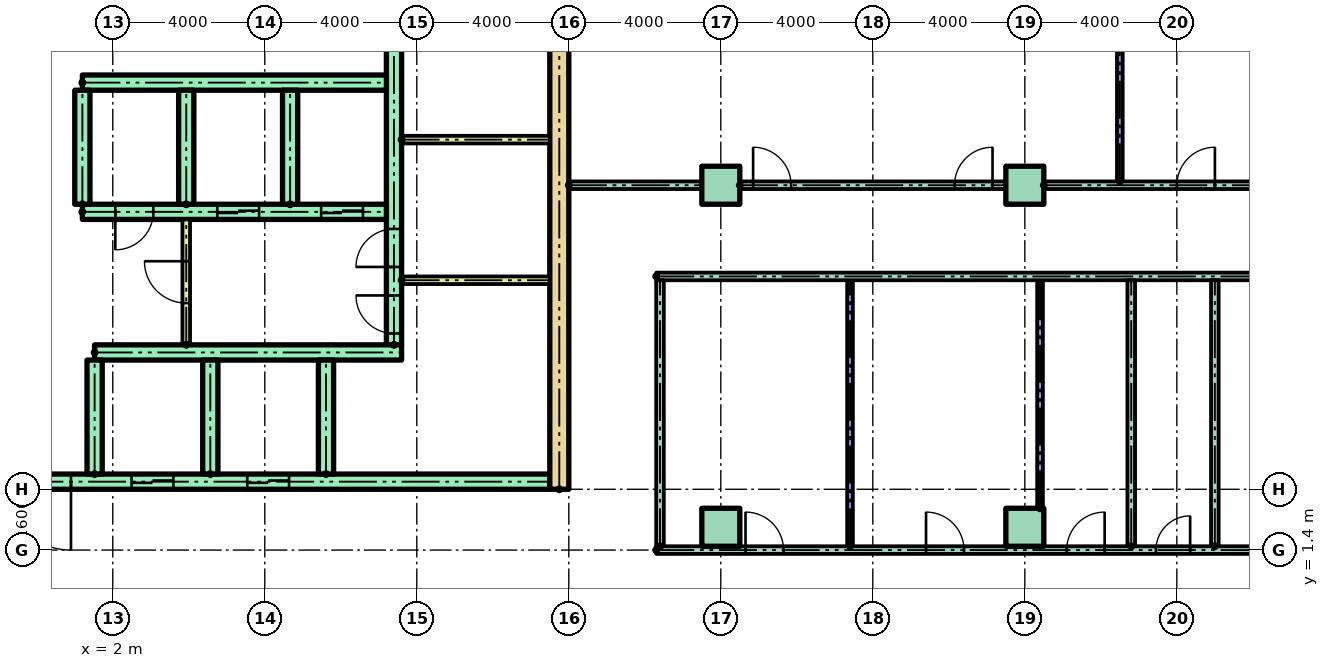
"""IFC4 building model, lengths in metres.
Left out: names, types, materials, properties, quantities, classifications, styles, units other than length and angle.
Written with IfcOpenShell. Run it as: python <this file> out.ifc"""

import sys

from ifc_helpers import new_model, si_unit, direction, frame, frame_2d, origin, origin_2d, place, context, subcontext, project, spatial, rectangle, extrude, element, fill, save


model = new_model("IFC4")
c1 = context("Model", 3, precision=1e-05, world=origin(), true_north=direction((0.0, 1.0)))
c2 = subcontext(c1, "Body", "Model", "MODEL_VIEW")
j1 = project(units=[si_unit("LENGTHUNIT", "METRE"), si_unit("PLANEANGLEUNIT", "RADIAN")], contexts=[c1])
p1 = place(None, origin())
s1 = spatial("IfcSite", under=j1, at=p1, CompositionType="ELEMENT")
p2 = place(p1, origin())
s2 = spatial("IfcBuilding", under=s1, at=p2, CompositionType="ELEMENT")
p3 = place(p2, frame((0.0, 0.0, 14.0)))
s3 = spatial("IfcBuildingStorey", under=s2, at=p3, CompositionType="ELEMENT", Elevation=14.0)
for number, where in (
    (1, (18.0, 2.0, 0.0)),
    (2, (26.0, 2.0, 0.0)),
    (3, (18.0, 11.0, 0.0)),
    (4, (26.0, 11.0, 0.0)),
):
    element("IfcColumn", number, at=place(p3, frame(where)), inside=s3, PredefinedType="COLUMN", context=c2, shape_type="SweptSolid", body=[
        extrude(rectangle(XDim=1.0, YDim=1.0, at=origin_2d()), origin(), (0.0, 0.0, 1.0), 4.0),
    ])
p4 = place(p3, frame((13.75, 3.0, 0.0), z_axis=(0.0, 0.0, 1.0), x_axis=(0.0, 1.0, 0.0)))
e5 = element("IfcWall", 5, at=p4, inside=s3, PredefinedType="SHEAR", context=c2, shape_type="SweptSolid", body=[
    extrude(rectangle(XDim=17.0, YDim=0.5, at=frame_2d((8.5, 0.0))), origin(), (0.0, 0.0, 1.0), 3.7),
])
p5 = place(p3, frame((9.4, 6.8, 0.0), z_axis=(0.0, 0.0, 1.0), x_axis=(0.0, 1.0, 0.0)))
e6 = element("IfcWall", 6, at=p5, inside=s3, PredefinedType="SHEAR", context=c2, shape_type="SweptSolid", body=[
    extrude(rectangle(XDim=12.7, YDim=0.4, at=frame_2d((6.35, 0.0))), origin(), (0.0, 0.0, 1.0), 3.7),
])
p6 = place(p5, frame((0.3, 0.0, 0.0)))
e7 = element("IfcOpeningElement", 7, at=p6, cuts=e6, PredefinedType="OPENING", context=c2, shape_type="SweptSolid", body=[
    extrude(rectangle(XDim=1.0, YDim=2.1, at=frame_2d((0.5, 1.05))), frame((0.0, 0.21, 0.0), z_axis=(0.0, -1.0, 0.0), x_axis=(1.0, 0.0, 0.0)), (0.0, 0.0, 1.0), 0.42),
])
p7 = place(p5, frame((2.05, 0.0, 0.0)))
e8 = element("IfcOpeningElement", 8, at=p7, cuts=e6, PredefinedType="OPENING", context=c2, shape_type="SweptSolid", body=[
    extrude(rectangle(XDim=1.0, YDim=2.1, at=frame_2d((0.5, 1.05))), frame((0.0, 0.21, 0.0), z_axis=(0.0, -1.0, 0.0), x_axis=(1.0, 0.0, 0.0)), (0.0, 0.0, 1.0), 0.42),
])
p8 = place(p5, frame((7.925, 0.0, 0.0)))
e9 = element("IfcOpeningElement", 9, at=p8, cuts=e6, PredefinedType="OPENING", context=c2, shape_type="SweptSolid", body=[
    extrude(rectangle(XDim=1.0, YDim=2.1, at=frame_2d((0.5, 1.05))), frame((0.0, 0.21, 0.0), z_axis=(0.0, -1.0, 0.0), x_axis=(1.0, 0.0, 0.0)), (0.0, 0.0, 1.0), 0.42),
])
p9 = place(p3, frame((-13.5, 3.2, 0.0)))
e10 = element("IfcWall", 10, at=p9, inside=s3, PredefinedType="SHEAR", context=c2, shape_type="SweptSolid", body=[
    extrude(rectangle(XDim=27.0, YDim=0.4, at=frame_2d((13.5, 0.0))), origin(), (0.0, 0.0, 1.0), 3.7),
])
p10 = place(p9, frame((6.861, 0.0, 0.0)))
e11 = element("IfcOpeningElement", 11, at=p10, cuts=e10, PredefinedType="OPENING", context=c2, shape_type="SweptSolid", body=[
    extrude(rectangle(XDim=1.1, YDim=2.1, at=frame_2d((0.55, 1.05))), frame((0.0, 0.21, 0.0), z_axis=(0.0, -1.0, 0.0), x_axis=(1.0, 0.0, 0.0)), (0.0, 0.0, 1.0), 0.42),
])
p11 = place(p9, frame((9.906, 0.0, 0.0)))
e12 = element("IfcOpeningElement", 12, at=p11, cuts=e10, PredefinedType="OPENING", context=c2, shape_type="SweptSolid", body=[
    extrude(rectangle(XDim=1.1, YDim=2.1, at=frame_2d((0.55, 1.05))), frame((0.0, 0.21, 0.0), z_axis=(0.0, -1.0, 0.0), x_axis=(1.0, 0.0, 0.0)), (0.0, 0.0, 1.0), 0.42),
])
p12 = place(p9, frame((15.994, 0.0, 0.0)))
e13 = element("IfcOpeningElement", 13, at=p12, cuts=e10, PredefinedType="OPENING", context=c2, shape_type="SweptSolid", body=[
    extrude(rectangle(XDim=1.1, YDim=2.1, at=frame_2d((0.55, 1.05))), frame((0.0, 0.21, 0.0), z_axis=(0.0, -1.0, 0.0), x_axis=(1.0, 0.0, 0.0)), (0.0, 0.0, 1.0), 0.42),
])
p13 = place(p9, frame((19.039, 0.0, 0.0)))
e14 = element("IfcOpeningElement", 14, at=p13, cuts=e10, PredefinedType="OPENING", context=c2, shape_type="SweptSolid", body=[
    extrude(rectangle(XDim=1.1, YDim=2.1, at=frame_2d((0.55, 1.05))), frame((0.0, 0.21, 0.0), z_axis=(0.0, -1.0, 0.0), x_axis=(1.0, 0.0, 0.0)), (0.0, 0.0, 1.0), 0.42),
])
p14 = place(p9, frame((12.6, 0.0, 0.0)))
e15 = element("IfcOpeningElement", 15, at=p14, cuts=e10, PredefinedType="OPENING", context=c2, shape_type="SweptSolid", body=[
    extrude(rectangle(XDim=1.8, YDim=2.1, at=frame_2d((0.9, 1.05))), frame((0.0, 0.21, 0.0), z_axis=(0.0, -1.0, 0.0), x_axis=(1.0, 0.0, 0.0)), (0.0, 0.0, 1.0), 0.42),
])
p15 = place(p3, frame((1.522, 6.6, 0.0)))
e16 = element("IfcWall", 16, at=p15, inside=s3, PredefinedType="SHEAR", context=c2, shape_type="SweptSolid", body=[
    extrude(rectangle(XDim=8.078, YDim=0.4, at=frame_2d((4.039, 0.0))), origin(), (0.0, 0.0, 1.0), 3.7),
])
for number, where, z_axis, x_axis in (
    (17, (1.522, 3.4, 0.0), (0.0, 0.0, 1.0), (0.0, 1.0, 0.0)),
    (18, (4.567, 3.4, 0.0), (0.0, 0.0, 1.0), (0.0, 1.0, 0.0)),
    (19, (7.611, 3.4, 0.0), (0.0, 0.0, 1.0), (0.0, 1.0, 0.0)),
):
    element("IfcWall", number, at=place(p3, frame(where, z_axis=z_axis, x_axis=x_axis)), inside=s3, PredefinedType="SHEAR", context=c2, shape_type="SweptSolid", body=[
        extrude(rectangle(XDim=3.0, YDim=0.4, at=frame_2d((1.5, 0.0))), origin(), (0.0, 0.0, 1.0), 3.7),
    ])
p16 = place(p3, frame((1.2, 10.3, 0.0)))
e20 = element("IfcWall", 20, at=p16, inside=s3, PredefinedType="SHEAR", context=c2, shape_type="SweptSolid", body=[
    extrude(rectangle(XDim=8.0, YDim=0.4, at=frame_2d((4.0, 0.0))), origin(), (0.0, 0.0, 1.0), 3.7),
])
p17 = place(p16, frame((3.55, 0.0, 0.0)))
e21 = element("IfcOpeningElement", 21, at=p17, cuts=e20, PredefinedType="OPENING", context=c2, shape_type="SweptSolid", body=[
    extrude(rectangle(XDim=1.1, YDim=2.1, at=frame_2d((0.55, 1.05))), frame((0.0, 0.21, 0.0), z_axis=(0.0, -1.0, 0.0), x_axis=(1.0, 0.0, 0.0)), (0.0, 0.0, 1.0), 0.42),
])
p18 = place(p16, frame((6.283, 0.0, 0.0)))
e22 = element("IfcOpeningElement", 22, at=p18, cuts=e20, PredefinedType="OPENING", context=c2, shape_type="SweptSolid", body=[
    extrude(rectangle(XDim=1.1, YDim=2.1, at=frame_2d((0.55, 1.05))), frame((0.0, 0.21, 0.0), z_axis=(0.0, -1.0, 0.0), x_axis=(1.0, 0.0, 0.0)), (0.0, 0.0, 1.0), 0.42),
])
p19 = place(p16, frame((0.867, 0.0, 0.0)))
e23 = element("IfcOpeningElement", 23, at=p19, cuts=e20, PredefinedType="OPENING", context=c2, shape_type="SweptSolid", body=[
    extrude(rectangle(XDim=1.0, YDim=2.1, at=frame_2d((0.5, 1.05))), frame((0.0, 0.21, 0.0), z_axis=(0.0, -1.0, 0.0), x_axis=(1.0, 0.0, 0.0)), (0.0, 0.0, 1.0), 0.42),
])
p20 = place(p3, frame((1.2, 13.7, 0.0)))
e24 = element("IfcWall", 24, at=p20, inside=s3, PredefinedType="SHEAR", context=c2, shape_type="SweptSolid", body=[
    extrude(rectangle(XDim=8.0, YDim=0.4, at=frame_2d((4.0, 0.0))), origin(), (0.0, 0.0, 1.0), 3.7),
])
for number, where, z_axis, x_axis in (
    (25, (1.2, 10.5, 0.0), (0.0, 0.0, 1.0), (0.0, 1.0, 0.0)),
    (26, (3.933, 10.5, 0.0), (0.0, 0.0, 1.0), (0.0, 1.0, 0.0)),
    (27, (6.667, 10.5, 0.0), (0.0, 0.0, 1.0), (0.0, 1.0, 0.0)),
):
    element("IfcWall", number, at=place(p3, frame(where, z_axis=z_axis, x_axis=x_axis)), inside=s3, PredefinedType="SHEAR", context=c2, shape_type="SweptSolid", body=[
        extrude(rectangle(XDim=3.0, YDim=0.4, at=frame_2d((1.5, 0.0))), origin(), (0.0, 0.0, 1.0), 3.7),
    ])
p21 = place(p3, frame((3.933, 6.8, 0.0), z_axis=(0.0, 0.0, 1.0), x_axis=(0.0, 1.0, 0.0)))
e28 = element("IfcWall", 28, at=p21, inside=s3, PredefinedType="PARTITIONING", context=c2, shape_type="SweptSolid", body=[
    extrude(rectangle(XDim=3.3, YDim=0.2, at=frame_2d((1.65, 0.0))), origin(), (0.0, 0.0, 1.0), 3.7),
])
p22 = place(p21, frame((1.1, 0.0, 0.0)))
e29 = element("IfcOpeningElement", 29, at=p22, cuts=e28, PredefinedType="OPENING", context=c2, shape_type="SweptSolid", body=[
    extrude(rectangle(XDim=1.1, YDim=2.1, at=frame_2d((0.55, 1.05))), frame((0.0, 0.11, 0.0), z_axis=(0.0, -1.0, 0.0), x_axis=(1.0, 0.0, 0.0)), (0.0, 0.0, 1.0), 0.22),
])
for number, where in (
    (30, (9.6, 8.5, 0.0)),
    (31, (9.6, 12.2, 0.0)),
):
    element("IfcWall", number, at=place(p3, frame(where)), inside=s3, PredefinedType="PARTITIONING", context=c2, shape_type="SweptSolid", body=[
        extrude(rectangle(XDim=3.9, YDim=0.2, at=frame_2d((1.95, 0.0))), origin(), (0.0, 0.0, 1.0), 3.7),
    ])
p23 = place(p3, frame((16.3, 1.4, 0.0)))
e32 = element("IfcWall", 32, at=p23, inside=s3, PredefinedType="PARTITIONING", context=c2, shape_type="SweptSolid", body=[
    extrude(rectangle(XDim=20.6, YDim=0.2, at=frame_2d((10.3, 0.0))), origin(), (0.0, 0.0, 1.0), 3.7),
])
p24 = place(p23, frame((2.35, 0.0, 0.0)))
e33 = element("IfcOpeningElement", 33, at=p24, cuts=e32, PredefinedType="OPENING", context=c2, shape_type="SweptSolid", body=[
    extrude(rectangle(XDim=1.0, YDim=2.1, at=frame_2d((0.5, 1.05))), frame((0.0, 0.11, 0.0), z_axis=(0.0, -1.0, 0.0), x_axis=(1.0, 0.0, 0.0)), (0.0, 0.0, 1.0), 0.22),
])
p25 = place(p23, frame((7.1, 0.0, 0.0)))
e34 = element("IfcOpeningElement", 34, at=p25, cuts=e32, PredefinedType="OPENING", context=c2, shape_type="SweptSolid", body=[
    extrude(rectangle(XDim=1.0, YDim=2.1, at=frame_2d((0.5, 1.05))), frame((0.0, 0.11, 0.0), z_axis=(0.0, -1.0, 0.0), x_axis=(1.0, 0.0, 0.0)), (0.0, 0.0, 1.0), 0.22),
])
p26 = place(p23, frame((10.8, 0.0, 0.0)))
e35 = element("IfcOpeningElement", 35, at=p26, cuts=e32, PredefinedType="OPENING", context=c2, shape_type="SweptSolid", body=[
    extrude(rectangle(XDim=1.0, YDim=2.1, at=frame_2d((0.5, 1.05))), frame((0.0, 0.11, 0.0), z_axis=(0.0, -1.0, 0.0), x_axis=(1.0, 0.0, 0.0)), (0.0, 0.0, 1.0), 0.22),
])
p27 = place(p23, frame((13.15, 0.0, 0.0)))
e36 = element("IfcOpeningElement", 36, at=p27, cuts=e32, PredefinedType="OPENING", context=c2, shape_type="SweptSolid", body=[
    extrude(rectangle(XDim=0.9, YDim=2.1, at=frame_2d((0.45, 1.05))), frame((0.0, 0.11, 0.0), z_axis=(0.0, -1.0, 0.0), x_axis=(1.0, 0.0, 0.0)), (0.0, 0.0, 1.0), 0.22),
])
p28 = place(p3, frame((16.3, 8.6, 0.0)))
e37 = element("IfcWall", 37, at=p28, inside=s3, PredefinedType="PARTITIONING", context=c2, shape_type="SweptSolid", body=[
    extrude(rectangle(XDim=21.3, YDim=0.2, at=frame_2d((10.65, 0.0))), origin(), (0.0, 0.0, 1.0), 3.7),
])
p29 = place(p3, frame((14.0, 11.0, 0.0)))
e38 = element("IfcWall", 38, at=p29, inside=s3, PredefinedType="PARTITIONING", context=c2, shape_type="SweptSolid", body=[
    extrude(rectangle(XDim=3.5, YDim=0.2, at=frame_2d((1.75, 0.0))), origin(), (0.0, 0.0, 1.0), 3.7),
])
p30 = place(p3, frame((18.5, 11.0, 0.0)))
e39 = element("IfcWall", 39, at=p30, inside=s3, PredefinedType="PARTITIONING", context=c2, shape_type="SweptSolid", body=[
    extrude(rectangle(XDim=7.0, YDim=0.2, at=frame_2d((3.5, 0.0))), origin(), (0.0, 0.0, 1.0), 3.7),
])
p31 = place(p30, frame((0.35, 0.0, 0.0)))
e40 = element("IfcOpeningElement", 40, at=p31, cuts=e39, PredefinedType="OPENING", context=c2, shape_type="SweptSolid", body=[
    extrude(rectangle(XDim=1.0, YDim=2.1, at=frame_2d((0.5, 1.05))), frame((0.0, 0.11, 0.0), z_axis=(0.0, -1.0, 0.0), x_axis=(1.0, 0.0, 0.0)), (0.0, 0.0, 1.0), 0.22),
])
p32 = place(p30, frame((5.65, 0.0, 0.0)))
e41 = element("IfcOpeningElement", 41, at=p32, cuts=e39, PredefinedType="OPENING", context=c2, shape_type="SweptSolid", body=[
    extrude(rectangle(XDim=1.0, YDim=2.1, at=frame_2d((0.5, 1.05))), frame((0.0, 0.11, 0.0), z_axis=(0.0, -1.0, 0.0), x_axis=(1.0, 0.0, 0.0)), (0.0, 0.0, 1.0), 0.22),
])
p33 = place(p3, frame((26.5, 11.0, 0.0)))
e42 = element("IfcWall", 42, at=p33, inside=s3, PredefinedType="PARTITIONING", context=c2, shape_type="SweptSolid", body=[
    extrude(rectangle(XDim=7.0, YDim=0.2, at=frame_2d((3.5, 0.0))), origin(), (0.0, 0.0, 1.0), 3.7),
])
p34 = place(p33, frame((3.502, 0.0, 0.0)))
e43 = element("IfcOpeningElement", 43, at=p34, cuts=e42, PredefinedType="OPENING", context=c2, shape_type="SweptSolid", body=[
    extrude(rectangle(XDim=1.0, YDim=2.1, at=frame_2d((0.5, 1.05))), frame((0.0, 0.11, 0.0), z_axis=(0.0, -1.0, 0.0), x_axis=(1.0, 0.0, 0.0)), (0.0, 0.0, 1.0), 0.22),
])
p35 = place(p33, frame((5.65, 0.0, 0.0)))
e44 = element("IfcOpeningElement", 44, at=p35, cuts=e42, PredefinedType="OPENING", context=c2, shape_type="SweptSolid", body=[
    extrude(rectangle(XDim=1.0, YDim=2.1, at=frame_2d((0.5, 1.05))), frame((0.0, 0.11, 0.0), z_axis=(0.0, -1.0, 0.0), x_axis=(1.0, 0.0, 0.0)), (0.0, 0.0, 1.0), 0.22),
])
p36 = place(p3, frame((16.4, 1.5, 0.0), z_axis=(0.0, 0.0, 1.0), x_axis=(0.0, 1.0, 0.0)))
e45 = element("IfcWall", 45, at=p36, inside=s3, PredefinedType="PARTITIONING", context=c2, shape_type="SweptSolid", body=[
    extrude(rectangle(XDim=7.0, YDim=0.2, at=frame_2d((3.5, 0.0))), origin(), (0.0, 0.0, 1.0), 3.7),
])
p37 = place(p3, frame((21.4, 1.5, 0.0), z_axis=(0.0, 0.0, 1.0), x_axis=(0.0, 1.0, 0.0)))
e46 = element("IfcWall", 46, at=p37, inside=s3, PredefinedType="PARTITIONING", context=c2, shape_type="SweptSolid", body=[
    extrude(rectangle(XDim=7.0, YDim=0.15, at=frame_2d((3.5, 0.0))), origin(), (0.0, 0.0, 1.0), 3.7),
])
p38 = place(p3, frame((26.4, 2.5, 0.0), z_axis=(0.0, 0.0, 1.0), x_axis=(0.0, 1.0, 0.0)))
e47 = element("IfcWall", 47, at=p38, inside=s3, PredefinedType="PARTITIONING", context=c2, shape_type="SweptSolid", body=[
    extrude(rectangle(XDim=6.0, YDim=0.15, at=frame_2d((3.0, 0.0))), origin(), (0.0, 0.0, 1.0), 3.7),
])
p39 = place(p3, frame((28.5, 11.1, 0.0), z_axis=(0.0, 0.0, 1.0), x_axis=(0.0, 1.0, 0.0)))
e48 = element("IfcWall", 48, at=p39, inside=s3, PredefinedType="PARTITIONING", context=c2, shape_type="SweptSolid", body=[
    extrude(rectangle(XDim=8.5, YDim=0.15, at=frame_2d((4.25, 0.0))), origin(), (0.0, 0.0, 1.0), 3.7),
])
for number, where, z_axis, x_axis in (
    (49, (28.8, 1.5, 0.0), (0.0, 0.0, 1.0), (0.0, 1.0, 0.0)),
    (50, (31.0, 1.5, 0.0), (0.0, 0.0, 1.0), (0.0, 1.0, 0.0)),
):
    element("IfcWall", number, at=place(p3, frame(where, z_axis=z_axis, x_axis=x_axis)), inside=s3, PredefinedType="PARTITIONING", context=c2, shape_type="SweptSolid", body=[
        extrude(rectangle(XDim=7.0, YDim=0.2, at=frame_2d((3.5, 0.0))), origin(), (0.0, 0.0, 1.0), 3.7),
    ])
p40 = place(p12, origin())
e51 = element("IfcDoor", 51, at=p40, inside=s3, OperationType="SLIDING_TO_LEFT", PredefinedType="DOOR", context=c2, shape_type="SweptSolid", body=[
    extrude(rectangle(XDim=1.1, YDim=2.1, at=frame_2d((0.55, 1.05))), frame((0.0, 0.025, 0.0), z_axis=(0.0, -1.0, 0.0), x_axis=(1.0, 0.0, 0.0)), (0.0, 0.0, 1.0), 0.05),
])
fill(e13, e51)
p41 = place(p13, origin())
e52 = element("IfcDoor", 52, at=p41, inside=s3, OperationType="SLIDING_TO_LEFT", PredefinedType="DOOR", context=c2, shape_type="SweptSolid", body=[
    extrude(rectangle(XDim=1.1, YDim=2.1, at=frame_2d((0.55, 1.05))), frame((0.0, 0.025, 0.0), z_axis=(0.0, -1.0, 0.0), x_axis=(1.0, 0.0, 0.0)), (0.0, 0.0, 1.0), 0.05),
])
fill(e14, e52)
p42 = place(p14, frame((1.8, 0.0, 0.0), z_axis=(0.0, 0.0, 1.0), x_axis=(-1.0, 0.0, 0.0)))
e53 = element("IfcDoor", 53, at=p42, inside=s3, OperationType="DOUBLE_DOOR_SINGLE_SWING", PredefinedType="DOOR", context=c2, shape_type="SweptSolid", body=[
    extrude(rectangle(XDim=1.8, YDim=2.1, at=frame_2d((0.9, 1.05))), frame((0.0, 0.025, 0.0), z_axis=(0.0, -1.0, 0.0), x_axis=(1.0, 0.0, 0.0)), (0.0, 0.0, 1.0), 0.05),
])
fill(e15, e53)
p43 = place(p17, origin())
e54 = element("IfcDoor", 54, at=p43, inside=s3, OperationType="SLIDING_TO_LEFT", PredefinedType="DOOR", context=c2, shape_type="SweptSolid", body=[
    extrude(rectangle(XDim=1.1, YDim=2.1, at=frame_2d((0.55, 1.05))), frame((0.0, 0.025, 0.0), z_axis=(0.0, -1.0, 0.0), x_axis=(1.0, 0.0, 0.0)), (0.0, 0.0, 1.0), 0.05),
])
fill(e21, e54)
p44 = place(p18, origin())
e55 = element("IfcDoor", 55, at=p44, inside=s3, OperationType="SLIDING_TO_LEFT", PredefinedType="DOOR", context=c2, shape_type="SweptSolid", body=[
    extrude(rectangle(XDim=1.1, YDim=2.1, at=frame_2d((0.55, 1.05))), frame((0.0, 0.025, 0.0), z_axis=(0.0, -1.0, 0.0), x_axis=(1.0, 0.0, 0.0)), (0.0, 0.0, 1.0), 0.05),
])
fill(e22, e55)
p45 = place(p19, frame((1.0, 0.0, 0.0), z_axis=(0.0, 0.0, 1.0), x_axis=(-1.0, 0.0, 0.0)))
e56 = element("IfcDoor", 56, at=p45, inside=s3, OperationType="SINGLE_SWING_LEFT", PredefinedType="DOOR", context=c2, shape_type="SweptSolid", body=[
    extrude(rectangle(XDim=1.0, YDim=2.1, at=frame_2d((0.5, 1.05))), frame((0.0, 0.025, 0.0), z_axis=(0.0, -1.0, 0.0), x_axis=(1.0, 0.0, 0.0)), (0.0, 0.0, 1.0), 0.05),
])
fill(e23, e56)
p46 = place(p22, origin())
e57 = element("IfcDoor", 57, at=p46, inside=s3, OperationType="SINGLE_SWING_RIGHT", PredefinedType="DOOR", context=c2, shape_type="SweptSolid", body=[
    extrude(rectangle(XDim=1.1, YDim=2.1, at=frame_2d((0.55, 1.05))), frame((0.0, 0.025, 0.0), z_axis=(0.0, -1.0, 0.0), x_axis=(1.0, 0.0, 0.0)), (0.0, 0.0, 1.0), 0.05),
])
fill(e29, e57)
p47 = place(p6, origin())
e58 = element("IfcDoor", 58, at=p47, inside=s3, OperationType="SINGLE_SWING_RIGHT", PredefinedType="DOOR", context=c2, shape_type="SweptSolid", body=[
    extrude(rectangle(XDim=1.0, YDim=2.1, at=frame_2d((0.5, 1.05))), frame((0.0, 0.025, 0.0), z_axis=(0.0, -1.0, 0.0), x_axis=(1.0, 0.0, 0.0)), (0.0, 0.0, 1.0), 0.05),
])
fill(e7, e58)
p48 = place(p7, origin())
e59 = element("IfcDoor", 59, at=p48, inside=s3, OperationType="SINGLE_SWING_LEFT", PredefinedType="DOOR", context=c2, shape_type="SweptSolid", body=[
    extrude(rectangle(XDim=1.0, YDim=2.1, at=frame_2d((0.5, 1.05))), frame((0.0, 0.025, 0.0), z_axis=(0.0, -1.0, 0.0), x_axis=(1.0, 0.0, 0.0)), (0.0, 0.0, 1.0), 0.05),
])
fill(e8, e59)
p49 = place(p24, origin())
e60 = element("IfcDoor", 60, at=p49, inside=s3, OperationType="SINGLE_SWING_LEFT", PredefinedType="DOOR", context=c2, shape_type="SweptSolid", body=[
    extrude(rectangle(XDim=1.0, YDim=2.1, at=frame_2d((0.5, 1.05))), frame((0.0, 0.025, 0.0), z_axis=(0.0, -1.0, 0.0), x_axis=(1.0, 0.0, 0.0)), (0.0, 0.0, 1.0), 0.05),
])
fill(e33, e60)
p50 = place(p25, origin())
e61 = element("IfcDoor", 61, at=p50, inside=s3, OperationType="SINGLE_SWING_LEFT", PredefinedType="DOOR", context=c2, shape_type="SweptSolid", body=[
    extrude(rectangle(XDim=1.0, YDim=2.1, at=frame_2d((0.5, 1.05))), frame((0.0, 0.025, 0.0), z_axis=(0.0, -1.0, 0.0), x_axis=(1.0, 0.0, 0.0)), (0.0, 0.0, 1.0), 0.05),
])
fill(e34, e61)
p51 = place(p26, origin())
e62 = element("IfcDoor", 62, at=p51, inside=s3, OperationType="SINGLE_SWING_RIGHT", PredefinedType="DOOR", context=c2, shape_type="SweptSolid", body=[
    extrude(rectangle(XDim=1.0, YDim=2.1, at=frame_2d((0.5, 1.05))), frame((0.0, 0.025, 0.0), z_axis=(0.0, -1.0, 0.0), x_axis=(1.0, 0.0, 0.0)), (0.0, 0.0, 1.0), 0.05),
])
fill(e35, e62)
p52 = place(p27, origin())
e63 = element("IfcDoor", 63, at=p52, inside=s3, OperationType="SINGLE_SWING_RIGHT", PredefinedType="DOOR", context=c2, shape_type="SweptSolid", body=[
    extrude(rectangle(XDim=0.9, YDim=2.1, at=frame_2d((0.45, 1.05))), frame((0.0, 0.025, 0.0), z_axis=(0.0, -1.0, 0.0), x_axis=(1.0, 0.0, 0.0)), (0.0, 0.0, 1.0), 0.05),
])
fill(e36, e63)
p53 = place(p31, origin())
e64 = element("IfcDoor", 64, at=p53, inside=s3, OperationType="SINGLE_SWING_LEFT", PredefinedType="DOOR", context=c2, shape_type="SweptSolid", body=[
    extrude(rectangle(XDim=1.0, YDim=2.1, at=frame_2d((0.5, 1.05))), frame((0.0, 0.025, 0.0), z_axis=(0.0, -1.0, 0.0), x_axis=(1.0, 0.0, 0.0)), (0.0, 0.0, 1.0), 0.05),
])
fill(e40, e64)
p54 = place(p32, origin())
e65 = element("IfcDoor", 65, at=p54, inside=s3, OperationType="SINGLE_SWING_RIGHT", PredefinedType="DOOR", context=c2, shape_type="SweptSolid", body=[
    extrude(rectangle(XDim=1.0, YDim=2.1, at=frame_2d((0.5, 1.05))), frame((0.0, 0.025, 0.0), z_axis=(0.0, -1.0, 0.0), x_axis=(1.0, 0.0, 0.0)), (0.0, 0.0, 1.0), 0.05),
])
fill(e41, e65)
p55 = place(p34, origin())
e66 = element("IfcDoor", 66, at=p55, inside=s3, OperationType="SINGLE_SWING_RIGHT", PredefinedType="DOOR", context=c2, shape_type="SweptSolid", body=[
    extrude(rectangle(XDim=1.0, YDim=2.1, at=frame_2d((0.5, 1.05))), frame((0.0, 0.025, 0.0), z_axis=(0.0, -1.0, 0.0), x_axis=(1.0, 0.0, 0.0)), (0.0, 0.0, 1.0), 0.05),
])
fill(e43, e66)
save(model, sys.argv[1])
